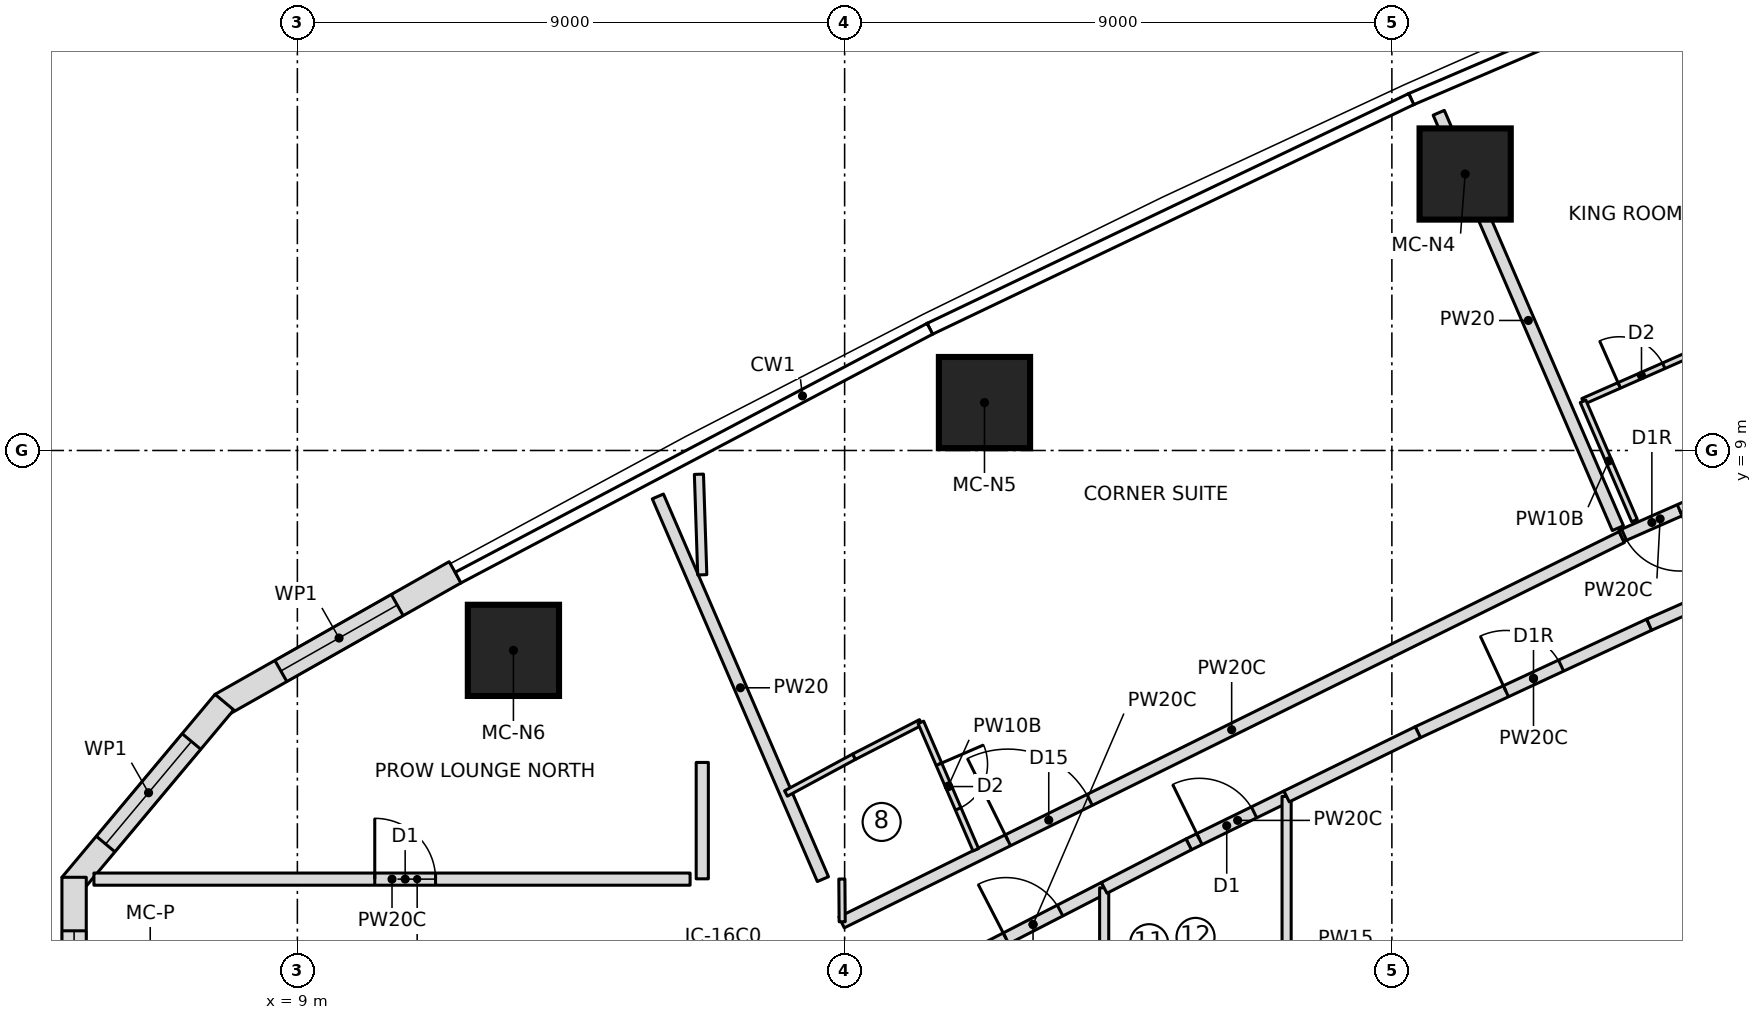
"""IFC4 building model, lengths in metres.
Left out: names, types, materials, properties, quantities, classifications, styles, units other than length and angle.
Written with IfcOpenShell. Run it as: python <this file> out.ifc"""

import sys

from ifc_helpers import new_model, si_unit, direction, frame, frame_2d, origin, origin_2d, place, context, subcontext, project, spatial, polyline, rectangle, outline, extrude, element, fill, save


model = new_model("IFC4")
c1 = context("Model", 3, precision=1e-05, world=origin(), true_north=direction((0.0, 1.0)))
c2 = subcontext(c1, "Body", "Model", "MODEL_VIEW")
j1 = project(units=[si_unit("LENGTHUNIT", "METRE"), si_unit("PLANEANGLEUNIT", "RADIAN")], contexts=[c1])
p1 = place(None, origin())
s1 = spatial("IfcSite", under=j1, at=p1, CompositionType="ELEMENT")
p2 = place(p1, origin())
s2 = spatial("IfcBuilding", under=s1, at=p2, CompositionType="ELEMENT")
p3 = place(p2, frame((0.0, 0.0, 130.2)))
s3 = spatial("IfcBuildingStorey", under=s2, at=p3, CompositionType="ELEMENT", Elevation=130.2)
for number, where, z_axis, x_axis in (
    (1, (28.205, 13.547, 0.0), (0.0, 0.0, 1.0), (1.0, 0.0, 0.0)),
    (2, (20.3, 9.788, 0.0), (0.0, 0.0, 1.0), (1.0, 0.0, 0.0)),
    (3, (12.553, 5.713, 0.0), (0.0, 0.0, 1.0), (1.0, 0.0, 0.0)),
):
    element("IfcColumn", number, at=place(p3, frame(where, z_axis=z_axis, x_axis=x_axis)), inside=s3, PredefinedType="COLUMN", context=c2, shape_type="SweptSolid", body=[
        extrude(rectangle(XDim=1.5, YDim=1.5, at=origin_2d()), origin(), (0.0, 0.0, 1.0), 3.55),
    ])
p4 = place(p3, frame((11.594, 6.997, 0.0), z_axis=(0.0, 0.0, 1.0), x_axis=(-0.870045255208, -0.492971859125, 0.0)))
e4 = element("IfcWall", 4, at=p4, inside=s3, PredefinedType="NOTDEFINED", context=c2, shape_type="SweptSolid", body=[
    extrude(outline(polyline([(0.0, -0.2), (4.424, -0.2), (4.352, 0.2), (0.0, 0.2), (0.0, -0.2)])), origin(), (0.0, 0.0, 1.0), 3.25),
])
p5 = place(p4, frame((1.094, 0.0, 0.6)))
e5 = element("IfcOpeningElement", 5, at=p5, cuts=e4, PredefinedType="OPENING", context=c2, shape_type="SweptSolid", body=[
    extrude(outline(polyline([(0.0, 1.35), (0.084, 1.771), (0.322, 2.128), (0.679, 2.366), (1.1, 2.45), (1.521, 2.366), (1.878, 2.128), (2.116, 1.771), (2.2, 1.35), (2.2, 1.1), (2.116, 0.679), (1.878, 0.322), (1.521, 0.084), (1.1, 0.0), (0.679, 0.084), (0.322, 0.322), (0.084, 0.679), (0.0, 1.1), (0.0, 1.35)])), frame((0.0, 0.21, 0.0), z_axis=(0.0, -1.0, 0.0), x_axis=(1.0, 0.0, 0.0)), (0.0, 0.0, 1.0), 0.42),
])
p6 = place(p3, frame((7.777, 4.834, 0.0), z_axis=(0.0, 0.0, 1.0), x_axis=(-0.641787918235, -0.766882173484, 0.0)))
e6 = element("IfcWall", 6, at=p6, inside=s3, PredefinedType="NOTDEFINED", context=c2, shape_type="SweptSolid", body=[
    extrude(outline(polyline([(-0.036, -0.2), (3.888, -0.2), (3.743, 0.2), (0.036, 0.2), (-0.036, -0.2)])), origin(), (0.0, 0.0, 1.0), 3.25),
])
p7 = place(p6, frame((0.808, 0.0, 0.6)))
e7 = element("IfcOpeningElement", 7, at=p7, cuts=e6, PredefinedType="OPENING", context=c2, shape_type="SweptSolid", body=[
    extrude(outline(polyline([(0.0, 1.35), (0.084, 1.771), (0.322, 2.128), (0.679, 2.366), (1.1, 2.45), (1.521, 2.366), (1.878, 2.128), (2.116, 1.771), (2.2, 1.35), (2.2, 1.1), (2.116, 0.679), (1.878, 0.322), (1.521, 0.084), (1.1, 0.0), (0.679, 0.084), (0.322, 0.322), (0.084, 0.679), (0.0, 1.1), (0.0, 1.35)])), frame((0.0, 0.21, 0.0), z_axis=(0.0, -1.0, 0.0), x_axis=(1.0, 0.0, 0.0)), (0.0, 0.0, 1.0), 0.42),
])
p8 = place(p3, frame((5.328, 1.908, 0.0), z_axis=(0.0, 0.0, 1.0), x_axis=(0.0, -1.0, 0.0)))
e8 = element("IfcWall", 8, at=p8, inside=s3, PredefinedType="NOTDEFINED", context=c2, shape_type="SweptSolid", body=[
    extrude(outline(polyline([(-0.073, -0.2), (3.888, -0.2), (3.743, 0.2), (0.073, 0.2), (-0.073, -0.2)])), origin(), (0.0, 0.0, 1.0), 3.25),
])
p9 = place(p8, frame((0.808, 0.0, 0.6)))
e9 = element("IfcOpeningElement", 9, at=p9, cuts=e8, PredefinedType="OPENING", context=c2, shape_type="SweptSolid", body=[
    extrude(outline(polyline([(0.0, 1.35), (0.084, 1.771), (0.322, 2.128), (0.679, 2.366), (1.1, 2.45), (1.521, 2.366), (1.878, 2.128), (2.116, 1.771), (2.2, 1.35), (2.2, 1.1), (2.116, 0.679), (1.878, 0.322), (1.521, 0.084), (1.1, 0.0), (0.679, 0.084), (0.322, 0.322), (0.084, 0.679), (0.0, 1.1), (0.0, 1.35)])), frame((0.0, 0.21, 0.0), z_axis=(0.0, -1.0, 0.0), x_axis=(1.0, 0.0, 0.0)), (0.0, 0.0, 1.0), 0.42),
])
p10 = place(p3, frame((5.654, 1.95, 0.0), z_axis=(0.0, 0.0, 1.0), x_axis=(1.0, 0.0, 0.0)))
e10 = element("IfcWall", 10, at=p10, inside=s3, PredefinedType="PARTITIONING", context=c2, shape_type="SweptSolid", body=[
    extrude(rectangle(XDim=9.804, YDim=0.2, at=frame_2d((4.902, 0.0))), origin(), (0.0, 0.0, 1.0), 3.25),
])
p11 = place(p10, frame((4.618, 0.0, 0.0)))
e11 = element("IfcOpeningElement", 11, at=p11, cuts=e10, PredefinedType="OPENING", context=c2, shape_type="SweptSolid", body=[
    extrude(rectangle(XDim=1.0, YDim=2.1, at=frame_2d((0.5, 1.05))), frame((0.0, 0.11, 0.0), z_axis=(0.0, -1.0, 0.0), x_axis=(1.0, 0.0, 0.0)), (0.0, 0.0, 1.0), 0.22),
])
p12 = place(p3, frame((17.643, 1.95, 0.0), z_axis=(0.0, 0.0, 1.0), x_axis=(-0.395994543879, 0.918252863441, 0.0)))
e12 = element("IfcWall", 12, at=p12, inside=s3, PredefinedType="PARTITIONING", context=c2, shape_type="SweptSolid", body=[
    extrude(rectangle(XDim=6.854, YDim=0.2, at=frame_2d((3.427, 0.0))), origin(), (0.0, 0.0, 1.0), 3.25),
])
p13 = place(p3, frame((17.95, 1.238, 0.0), z_axis=(0.0, 0.0, 1.0), x_axis=(0.896593504408, 0.44285447706, 0.0)))
e13 = element("IfcWall", 13, at=p13, inside=s3, PredefinedType="PARTITIONING", context=c2, shape_type="SweptSolid", body=[
    extrude(rectangle(XDim=14.31, YDim=0.2, at=frame_2d((7.155, 0.0))), origin(), (0.0, 0.0, 1.0), 3.25),
])
p14 = place(p13, frame((3.05, 0.0, 0.0)))
e14 = element("IfcOpeningElement", 14, at=p14, cuts=e13, PredefinedType="OPENING", context=c2, shape_type="SweptSolid", body=[
    extrude(rectangle(XDim=1.5, YDim=2.1, at=frame_2d((0.75, 1.05))), frame((0.0, 0.11, 0.0), z_axis=(0.0, -1.0, 0.0), x_axis=(1.0, 0.0, 0.0)), (0.0, 0.0, 1.0), 0.22),
])
p15 = place(p3, frame((17.036, 3.358, 0.0), z_axis=(0.0, 0.0, 1.0), x_axis=(0.879823588489, 0.475300382009, 0.0)))
e15 = element("IfcWall", 15, at=p15, inside=s3, PredefinedType="PARTITIONING", context=c2, shape_type="SweptSolid", body=[
    extrude(rectangle(XDim=1.273, YDim=0.1, at=frame_2d((0.636, 0.0))), origin(), (0.0, 0.0, 1.0), 3.25),
])
p16 = place(p3, frame((18.156, 3.963, 0.0), z_axis=(0.0, 0.0, 1.0), x_axis=(0.889106231322, 0.457700895154, 0.0)))
e16 = element("IfcWall", 16, at=p16, inside=s3, PredefinedType="PARTITIONING", context=c2, shape_type="SweptSolid", body=[
    extrude(rectangle(XDim=1.235, YDim=0.1, at=frame_2d((0.617, 0.0))), origin(), (0.0, 0.0, 1.0), 3.25),
])
p17 = place(p3, frame((19.254, 4.529, 0.0), z_axis=(0.0, 0.0, 1.0), x_axis=(0.395958457437, -0.9182684248, 0.0)))
e17 = element("IfcWall", 17, at=p17, inside=s3, PredefinedType="PARTITIONING", context=c2, shape_type="SweptSolid", body=[
    extrude(rectangle(XDim=2.282, YDim=0.1, at=frame_2d((1.141, 0.0))), origin(), (0.0, 0.0, 1.0), 3.25),
])
p18 = place(p17, frame((0.75, 0.0, 0.0)))
e18 = element("IfcOpeningElement", 18, at=p18, cuts=e17, PredefinedType="OPENING", context=c2, shape_type="SweptSolid", body=[
    extrude(rectangle(XDim=0.8, YDim=2.1, at=frame_2d((0.4, 1.05))), frame((0.0, 0.06, 0.0), z_axis=(0.0, -1.0, 0.0), x_axis=(1.0, 0.0, 0.0)), (0.0, 0.0, 1.0), 0.12),
])
p19 = place(p3, frame((30.717, 7.722, 0.0), z_axis=(0.0, 0.0, 1.0), x_axis=(-0.395993466394, 0.918253328104, 0.0)))
e19 = element("IfcWall", 19, at=p19, inside=s3, PredefinedType="PARTITIONING", context=c2, shape_type="SweptSolid", body=[
    extrude(rectangle(XDim=7.44, YDim=0.2, at=frame_2d((3.72, 0.0))), origin(), (0.0, 0.0, 1.0), 3.25),
])
p20 = place(p3, frame((32.05, 8.157, 0.0), z_axis=(0.0, 0.0, 1.0), x_axis=(-0.915155082005, -0.403101942293, 0.0)))
e20 = element("IfcWall", 20, at=p20, inside=s3, PredefinedType="PARTITIONING", context=c2, shape_type="SweptSolid", body=[
    extrude(rectangle(XDim=1.396, YDim=0.2, at=frame_2d((0.698, 0.0))), origin(), (0.0, 0.0, 1.0), 3.25),
])
p21 = place(p20, frame((0.346, 0.0, 0.0)))
e21 = element("IfcOpeningElement", 21, at=p21, cuts=e20, PredefinedType="OPENING", context=c2, shape_type="SweptSolid", body=[
    extrude(rectangle(XDim=1.0, YDim=2.1, at=frame_2d((0.5, 1.05))), frame((0.0, 0.11, 0.0), z_axis=(0.0, -1.0, 0.0), x_axis=(1.0, 0.0, 0.0)), (0.0, 0.0, 1.0), 0.22),
])
p22 = place(p3, frame((30.144, 9.809, 0.0), z_axis=(0.0, 0.0, 1.0), x_axis=(0.915122534717, 0.40317582573, 0.0)))
e22 = element("IfcWall", 22, at=p22, inside=s3, PredefinedType="PARTITIONING", context=c2, shape_type="SweptSolid", body=[
    extrude(rectangle(XDim=2.058, YDim=0.1, at=frame_2d((1.029, 0.0))), origin(), (0.0, 0.0, 1.0), 3.25),
])
p23 = place(p22, frame((0.65, 0.0, 0.0)))
e23 = element("IfcOpeningElement", 23, at=p23, cuts=e22, PredefinedType="OPENING", context=c2, shape_type="SweptSolid", body=[
    extrude(rectangle(XDim=0.8, YDim=2.1, at=frame_2d((0.4, 1.05))), frame((0.0, 0.06, 0.0), z_axis=(0.0, -1.0, 0.0), x_axis=(1.0, 0.0, 0.0)), (0.0, 0.0, 1.0), 0.12),
])
p24 = place(p3, frame((30.99, 7.846, 0.0), z_axis=(0.0, 0.0, 1.0), x_axis=(-0.396055229638, 0.918226690462, 0.0)))
e24 = element("IfcWall", 24, at=p24, inside=s3, PredefinedType="PARTITIONING", context=c2, shape_type="SweptSolid", body=[
    extrude(rectangle(XDim=2.137, YDim=0.1, at=frame_2d((1.069, 0.0))), origin(), (0.0, 0.0, 1.0), 3.25),
])
p25 = place(p3, frame((34.092, 10.95, 0.0), z_axis=(0.0, 0.0, 1.0), x_axis=(-0.395991607501, 0.918254129742, 0.0)))
e25 = element("IfcWall", 25, at=p25, inside=s3, PredefinedType="PARTITIONING", context=c2, shape_type="SweptSolid", body=[
    extrude(rectangle(XDim=5.841, YDim=0.2, at=frame_2d((2.92, 0.0))), origin(), (0.0, 0.0, 1.0), 3.25),
])
p26 = place(p3, frame((19.928, 0.602, 0.0), z_axis=(0.0, 0.0, 1.0), x_axis=(0.889134700325, 0.457645588505, 0.0)))
e26 = element("IfcWall", 26, at=p26, inside=s3, PredefinedType="PARTITIONING", context=c2, shape_type="SweptSolid", body=[
    extrude(rectangle(XDim=2.632, YDim=0.2, at=frame_2d((1.316, 0.0))), origin(), (0.0, 0.0, 1.0), 3.25),
])
p27 = place(p26, frame((0.816, 0.0, 0.0)))
e27 = element("IfcOpeningElement", 27, at=p27, cuts=e26, PredefinedType="OPENING", context=c2, shape_type="SweptSolid", body=[
    extrude(rectangle(XDim=1.0, YDim=2.1, at=frame_2d((0.5, 1.05))), frame((0.0, 0.11, 0.0), z_axis=(0.0, -1.0, 0.0), x_axis=(1.0, 0.0, 0.0)), (0.0, 0.0, 1.0), 0.22),
])
p28 = place(p3, frame((22.269, -1.807, 0.0), z_axis=(0.0, 0.0, 1.0), x_axis=(0.0, 1.0, 0.0)))
e28 = element("IfcWall", 28, at=p28, inside=s3, PredefinedType="PARTITIONING", context=c2, shape_type="SweptSolid", body=[
    extrude(rectangle(XDim=3.613, YDim=0.15, at=frame_2d((1.807, 0.0))), origin(), (0.0, 0.0, 1.0), 3.25),
])
p29 = place(p3, frame((23.659, 2.522, 0.0), z_axis=(0.0, 0.0, 1.0), x_axis=(0.898127473276, 0.439735195028, 0.0)))
e29 = element("IfcWall", 29, at=p29, inside=s3, PredefinedType="PARTITIONING", context=c2, shape_type="SweptSolid", body=[
    extrude(rectangle(XDim=1.793, YDim=0.2, at=frame_2d((0.896, 0.0))), origin(), (0.0, 0.0, 1.0), 3.25),
])
p30 = place(p29, frame((0.196, 0.0, 0.0)))
e30 = element("IfcOpeningElement", 30, at=p30, cuts=e29, PredefinedType="OPENING", context=c2, shape_type="SweptSolid", body=[
    extrude(rectangle(XDim=1.0, YDim=2.1, at=frame_2d((0.5, 1.05))), frame((0.0, 0.11, 0.0), z_axis=(0.0, -1.0, 0.0), x_axis=(1.0, 0.0, 0.0)), (0.0, 0.0, 1.0), 0.22),
])
p31 = place(p3, frame((22.269, 1.807, 0.0), z_axis=(0.0, 0.0, 1.0), x_axis=(0.88914982879, 0.457616195039, 0.0)))
e31 = element("IfcWall", 31, at=p31, inside=s3, PredefinedType="PARTITIONING", context=c2, shape_type="SweptSolid", body=[
    extrude(rectangle(XDim=1.563, YDim=0.2, at=frame_2d((0.782, 0.0))), origin(), (0.0, 0.0, 1.0), 3.25),
])
p32 = place(p3, frame((25.269, -3.31, 0.0), z_axis=(0.0, 0.0, 1.0), x_axis=(0.0, 1.0, 0.0)))
e32 = element("IfcWall", 32, at=p32, inside=s3, PredefinedType="PARTITIONING", context=c2, shape_type="SweptSolid", body=[
    extrude(rectangle(XDim=6.621, YDim=0.15, at=frame_2d((3.31, 0.0))), origin(), (0.0, 0.0, 1.0), 3.25),
])
p33 = place(p3, frame((27.427, 4.367, 0.0), z_axis=(0.0, 0.0, 1.0), x_axis=(0.906830275285, 0.421495968933, 0.0)))
e33 = element("IfcWall", 33, at=p33, inside=s3, PredefinedType="PARTITIONING", context=c2, shape_type="SweptSolid", body=[
    extrude(rectangle(XDim=4.195, YDim=0.2, at=frame_2d((2.098, 0.0))), origin(), (0.0, 0.0, 1.0), 3.25),
])
p34 = place(p33, frame((1.598, 0.0, 0.0)))
e34 = element("IfcOpeningElement", 34, at=p34, cuts=e33, PredefinedType="OPENING", context=c2, shape_type="SweptSolid", body=[
    extrude(rectangle(XDim=1.0, YDim=2.1, at=frame_2d((0.5, 1.05))), frame((0.0, 0.11, 0.0), z_axis=(0.0, -1.0, 0.0), x_axis=(1.0, 0.0, 0.0)), (0.0, 0.0, 1.0), 0.22),
])
p35 = place(p3, frame((31.231, 6.135, 0.0), z_axis=(0.0, 0.0, 1.0), x_axis=(0.915102334452, 0.403221672881, 0.0)))
e35 = element("IfcWall", 35, at=p35, inside=s3, PredefinedType="PARTITIONING", context=c2, shape_type="SweptSolid", body=[
    extrude(rectangle(XDim=2.269, YDim=0.2, at=frame_2d((1.135, 0.0))), origin(), (0.0, 0.0, 1.0), 3.25),
])
p36 = place(p3, frame((25.269, 3.31, 0.0), z_axis=(0.0, 0.0, 1.0), x_axis=(0.898155255728, 0.439678446831, 0.0)))
e36 = element("IfcWall", 36, at=p36, inside=s3, PredefinedType="PARTITIONING", context=c2, shape_type="SweptSolid", body=[
    extrude(rectangle(XDim=2.403, YDim=0.2, at=frame_2d((1.201, 0.0))), origin(), (0.0, 0.0, 1.0), 3.25),
])
p37 = place(p3, frame((15.604, 8.609, 0.0), z_axis=(0.0, 0.0, 1.0), x_axis=(0.033196927484, -0.999448830109, 0.0)))
e37 = element("IfcWall", 37, at=p37, inside=s3, PredefinedType="PARTITIONING", context=c2, shape_type="SweptSolid", body=[
    extrude(rectangle(XDim=1.655, YDim=0.15, at=frame_2d((0.827, 0.0))), origin(), (0.0, 0.0, 1.0), 3.25),
])
p38 = place(p3, frame((17.96, 1.249, 0.0), z_axis=(0.0, 0.0, 1.0), x_axis=(-0.007291472831, 0.999973416859, 0.0)))
e38 = element("IfcWall", 38, at=p38, inside=s3, PredefinedType="PARTITIONING", context=c2, shape_type="SweptSolid", body=[
    extrude(rectangle(XDim=0.703, YDim=0.1, at=frame_2d((0.352, 0.0))), origin(), (0.0, 0.0, 1.0), 3.25),
])
p39 = place(p3, frame((15.659, 3.869, 0.0), z_axis=(0.0, 0.0, 1.0), x_axis=(0.0, -1.0, 0.0)))
e39 = element("IfcWall", 39, at=p39, inside=s3, PredefinedType="PARTITIONING", context=c2, shape_type="SweptSolid", body=[
    extrude(rectangle(XDim=1.914, YDim=0.2, at=frame_2d((0.957, 0.0))), origin(), (0.0, 0.0, 1.0), 3.25),
])
p40 = place(p5, origin())
e40 = element("IfcWindow", 40, at=p40, inside=s3, PartitioningType="SINGLE_PANEL", PredefinedType="WINDOW", context=c2, shape_type="SweptSolid", body=[
    extrude(outline(polyline([(0.0, 1.35), (0.084, 1.771), (0.322, 2.128), (0.679, 2.366), (1.1, 2.45), (1.521, 2.366), (1.878, 2.128), (2.116, 1.771), (2.2, 1.35), (2.2, 1.1), (2.116, 0.679), (1.878, 0.322), (1.521, 0.084), (1.1, 0.0), (0.679, 0.084), (0.322, 0.322), (0.084, 0.679), (0.0, 1.1), (0.0, 1.35)])), frame((0.0, 0.17, 0.0), z_axis=(0.0, -1.0, 0.0), x_axis=(1.0, 0.0, 0.0)), (0.0, 0.0, 1.0), 0.06),
])
fill(e5, e40)
p41 = place(p7, origin())
e41 = element("IfcWindow", 41, at=p41, inside=s3, PartitioningType="SINGLE_PANEL", PredefinedType="WINDOW", context=c2, shape_type="SweptSolid", body=[
    extrude(outline(polyline([(0.0, 1.35), (0.084, 1.771), (0.322, 2.128), (0.679, 2.366), (1.1, 2.45), (1.521, 2.366), (1.878, 2.128), (2.116, 1.771), (2.2, 1.35), (2.2, 1.1), (2.116, 0.679), (1.878, 0.322), (1.521, 0.084), (1.1, 0.0), (0.679, 0.084), (0.322, 0.322), (0.084, 0.679), (0.0, 1.1), (0.0, 1.35)])), frame((0.0, 0.17, 0.0), z_axis=(0.0, -1.0, 0.0), x_axis=(1.0, 0.0, 0.0)), (0.0, 0.0, 1.0), 0.06),
])
fill(e7, e41)
p42 = place(p9, origin())
e42 = element("IfcWindow", 42, at=p42, inside=s3, PartitioningType="SINGLE_PANEL", PredefinedType="WINDOW", context=c2, shape_type="SweptSolid", body=[
    extrude(outline(polyline([(0.0, 1.35), (0.084, 1.771), (0.322, 2.128), (0.679, 2.366), (1.1, 2.45), (1.521, 2.366), (1.878, 2.128), (2.116, 1.771), (2.2, 1.35), (2.2, 1.1), (2.116, 0.679), (1.878, 0.322), (1.521, 0.084), (1.1, 0.0), (0.679, 0.084), (0.322, 0.322), (0.084, 0.679), (0.0, 1.1), (0.0, 1.35)])), frame((0.0, 0.17, 0.0), z_axis=(0.0, -1.0, 0.0), x_axis=(1.0, 0.0, 0.0)), (0.0, 0.0, 1.0), 0.06),
])
fill(e9, e42)
p43 = place(p11, origin())
e43 = element("IfcDoor", 43, at=p43, inside=s3, OperationType="SINGLE_SWING_LEFT", PredefinedType="DOOR", context=c2, shape_type="SweptSolid", body=[
    extrude(rectangle(XDim=1.0, YDim=2.1, at=frame_2d((0.5, 1.05))), frame((0.0, 0.025, 0.0), z_axis=(0.0, -1.0, 0.0), x_axis=(1.0, 0.0, 0.0)), (0.0, 0.0, 1.0), 0.05),
])
fill(e11, e43)
p44 = place(p18, origin())
e44 = element("IfcDoor", 44, at=p44, inside=s3, OperationType="SINGLE_SWING_LEFT", PredefinedType="DOOR", context=c2, shape_type="SweptSolid", body=[
    extrude(rectangle(XDim=0.8, YDim=2.1, at=frame_2d((0.4, 1.05))), frame((0.0, 0.025, 0.0), z_axis=(0.0, -1.0, 0.0), x_axis=(1.0, 0.0, 0.0)), (0.0, 0.0, 1.0), 0.05),
])
fill(e18, e44)
p45 = place(p14, origin())
e45 = element("IfcDoor", 45, at=p45, inside=s3, OperationType="DOUBLE_DOOR_SINGLE_SWING", PredefinedType="DOOR", context=c2, shape_type="SweptSolid", body=[
    extrude(rectangle(XDim=1.5, YDim=2.1, at=frame_2d((0.75, 1.05))), frame((0.0, 0.025, 0.0), z_axis=(0.0, -1.0, 0.0), x_axis=(1.0, 0.0, 0.0)), (0.0, 0.0, 1.0), 0.05),
])
fill(e14, e45)
p46 = place(p23, origin())
e46 = element("IfcDoor", 46, at=p46, inside=s3, OperationType="SINGLE_SWING_LEFT", PredefinedType="DOOR", context=c2, shape_type="SweptSolid", body=[
    extrude(rectangle(XDim=0.8, YDim=2.1, at=frame_2d((0.4, 1.05))), frame((0.0, 0.025, 0.0), z_axis=(0.0, -1.0, 0.0), x_axis=(1.0, 0.0, 0.0)), (0.0, 0.0, 1.0), 0.05),
])
fill(e23, e46)
p47 = place(p21, origin())
e47 = element("IfcDoor", 47, at=p47, inside=s3, OperationType="SINGLE_SWING_RIGHT", PredefinedType="DOOR", context=c2, shape_type="SweptSolid", body=[
    extrude(rectangle(XDim=1.0, YDim=2.1, at=frame_2d((0.5, 1.05))), frame((0.0, 0.025, 0.0), z_axis=(0.0, -1.0, 0.0), x_axis=(1.0, 0.0, 0.0)), (0.0, 0.0, 1.0), 0.05),
])
fill(e21, e47)
p48 = place(p27, origin())
e48 = element("IfcDoor", 48, at=p48, inside=s3, OperationType="SINGLE_SWING_RIGHT", PredefinedType="DOOR", context=c2, shape_type="SweptSolid", body=[
    extrude(rectangle(XDim=1.0, YDim=2.1, at=frame_2d((0.5, 1.05))), frame((0.0, 0.025, 0.0), z_axis=(0.0, -1.0, 0.0), x_axis=(1.0, 0.0, 0.0)), (0.0, 0.0, 1.0), 0.05),
])
fill(e27, e48)
p49 = place(p30, origin())
e49 = element("IfcDoor", 49, at=p49, inside=s3, OperationType="SINGLE_SWING_LEFT", PredefinedType="DOOR", context=c2, shape_type="SweptSolid", body=[
    extrude(rectangle(XDim=1.0, YDim=2.1, at=frame_2d((0.5, 1.05))), frame((0.0, 0.025, 0.0), z_axis=(0.0, -1.0, 0.0), x_axis=(1.0, 0.0, 0.0)), (0.0, 0.0, 1.0), 0.05),
])
fill(e30, e49)
p50 = place(p34, origin())
e50 = element("IfcDoor", 50, at=p50, inside=s3, OperationType="SINGLE_SWING_RIGHT", PredefinedType="DOOR", context=c2, shape_type="SweptSolid", body=[
    extrude(rectangle(XDim=1.0, YDim=2.1, at=frame_2d((0.5, 1.05))), frame((0.0, 0.025, 0.0), z_axis=(0.0, -1.0, 0.0), x_axis=(1.0, 0.0, 0.0)), (0.0, 0.0, 1.0), 0.05),
])
fill(e34, e50)
save(model, sys.argv[1])
